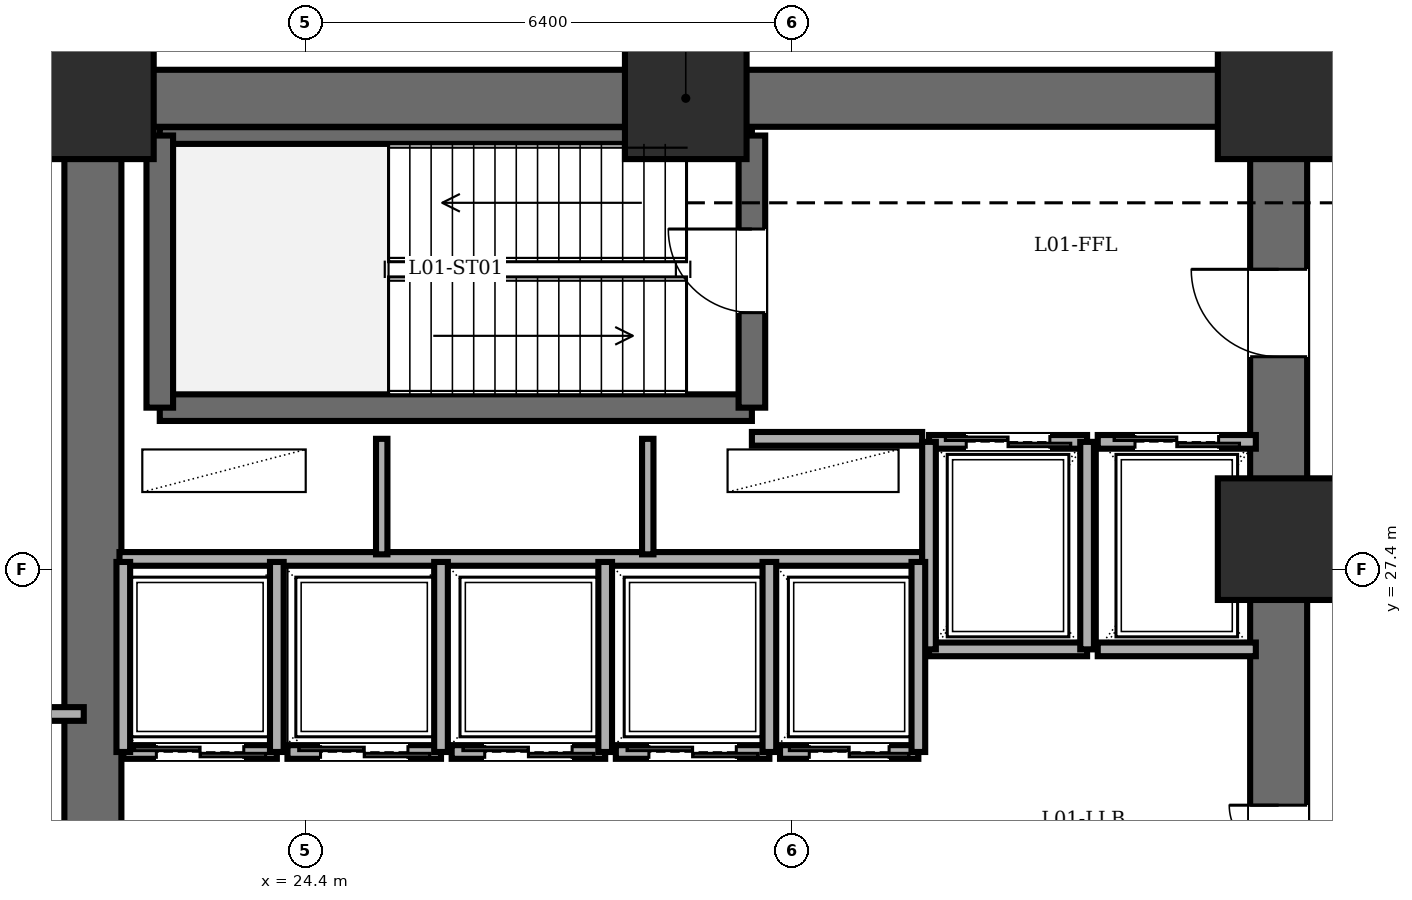
"""IFC4 building model, lengths in metres.
Left out: names, types, materials, properties, quantities, classifications, styles, units other than length and angle.
Written with IfcOpenShell. Run it as: python <this file> out.ifc"""

import sys

from ifc_helpers import new_model, si_unit, direction, frame, frame_2d, origin, origin_2d, place, context, subcontext, project, spatial, rectangle, extrude, element, fill, save


model = new_model("IFC4")
c1 = context("Model", 3, precision=1e-05, world=origin(), true_north=direction((0.0, 1.0)))
c2 = subcontext(c1, "Body", "Model", "MODEL_VIEW")
j1 = project(units=[si_unit("LENGTHUNIT", "METRE"), si_unit("PLANEANGLEUNIT", "RADIAN")], contexts=[c1])
p1 = place(None, origin())
s1 = spatial("IfcSite", under=j1, at=p1, CompositionType="ELEMENT")
p2 = place(p1, origin())
s2 = spatial("IfcBuilding", under=s1, at=p2, CompositionType="ELEMENT")
p3 = place(p2, origin())
s3 = spatial("IfcBuildingStorey", under=s2, at=p3, CompositionType="ELEMENT", Elevation=0.0)
for number, where, z_axis, x_axis in (
    (1, (37.2, 27.8, 0.0), (0.0, 0.0, 1.0), (1.0, 0.0, 0.0)),
    (2, (37.2, 33.6, 0.0), (0.0, 0.0, 1.0), (1.0, 0.0, 0.0)),
    (3, (29.4, 33.6, 0.0), (0.0, 0.0, 1.0), (1.0, 0.0, 0.0)),
    (4, (21.6, 33.6, 0.0), (0.0, 0.0, 1.0), (1.0, 0.0, 0.0)),
):
    element("IfcColumn", number, at=place(p3, frame(where, z_axis=z_axis, x_axis=x_axis)), inside=s3, PredefinedType="COLUMN", context=c2, shape_type="SweptSolid", body=[
        extrude(rectangle(XDim=1.6, YDim=1.6, at=origin_2d()), origin(), (0.0, 0.0, 1.0), 5.4),
    ])
p4 = place(p3, frame((21.6, 14.4, 0.0), z_axis=(0.0, 0.0, 1.0), x_axis=(0.0, 1.0, 0.0)))
e5 = element("IfcWall", 5, at=p4, inside=s3, PredefinedType="SHEAR", context=c2, shape_type="SweptSolid", body=[
    extrude(rectangle(XDim=19.2, YDim=0.75, at=frame_2d((9.6, 0.0))), origin(), (0.0, 0.0, 1.0), 5.18),
])
p5 = place(p3, frame((21.6, 33.6, 0.0), z_axis=(0.0, 0.0, 1.0), x_axis=(1.0, 0.0, 0.0)))
e6 = element("IfcWall", 6, at=p5, inside=s3, PredefinedType="SHEAR", context=c2, shape_type="SweptSolid", body=[
    extrude(rectangle(XDim=15.6, YDim=0.75, at=frame_2d((7.8, 0.0))), origin(), (0.0, 0.0, 1.0), 5.18),
])
p6 = place(p3, frame((37.2, 14.4, 0.0), z_axis=(0.0, 0.0, 1.0), x_axis=(0.0, 1.0, 0.0)))
e7 = element("IfcWall", 7, at=p6, inside=s3, PredefinedType="SHEAR", context=c2, shape_type="SweptSolid", body=[
    extrude(rectangle(XDim=19.2, YDim=0.75, at=frame_2d((9.6, 0.0))), origin(), (0.0, 0.0, 1.0), 5.18),
])
p7 = place(p6, frame((15.8, 0.0, 0.0)))
e8 = element("IfcOpeningElement", 8, at=p7, cuts=e7, PredefinedType="OPENING", context=c2, shape_type="SweptSolid", body=[
    extrude(rectangle(XDim=1.15, YDim=2.15, at=frame_2d((0.575, 1.075))), frame((0.0, 0.385, 0.0), z_axis=(0.0, -1.0, 0.0), x_axis=(1.0, 0.0, 0.0)), (0.0, 0.0, 1.0), 0.77),
])
p8 = place(p6, frame((3.6, 0.0, 0.0)))
e9 = element("IfcOpeningElement", 9, at=p8, cuts=e7, PredefinedType="OPENING", context=c2, shape_type="SweptSolid", body=[
    extrude(rectangle(XDim=1.1, YDim=2.15, at=frame_2d((0.55, 1.075))), frame((0.0, 0.385, 0.0), z_axis=(0.0, -1.0, 0.0), x_axis=(1.0, 0.0, 0.0)), (0.0, 0.0, 1.0), 0.77),
])
p9 = place(p6, frame((8.6, 0.0, 0.0)))
e10 = element("IfcOpeningElement", 10, at=p9, cuts=e7, PredefinedType="OPENING", context=c2, shape_type="SweptSolid", body=[
    extrude(rectangle(XDim=1.3, YDim=2.2, at=frame_2d((0.65, 1.1))), frame((0.0, 0.385, 0.0), z_axis=(0.0, -1.0, 0.0), x_axis=(1.0, 0.0, 0.0)), (0.0, 0.0, 1.0), 0.77),
])
p10 = place(p3, frame((22.48, 29.53, 0.0), z_axis=(0.0, 0.0, 1.0), x_axis=(1.0, 0.0, 0.0)))
e11 = element("IfcWall", 11, at=p10, inside=s3, PredefinedType="SOLIDWALL", context=c2, shape_type="SweptSolid", body=[
    extrude(rectangle(XDim=7.79, YDim=0.35, at=frame_2d((3.895, 0.0))), origin(), (0.0, 0.0, 1.0), 5.18),
])
p11 = place(p3, frame((22.48, 33.11, 0.0), z_axis=(0.0, 0.0, 1.0), x_axis=(1.0, 0.0, 0.0)))
e12 = element("IfcWall", 12, at=p11, inside=s3, PredefinedType="PARTITIONING", context=c2, shape_type="SweptSolid", body=[
    extrude(rectangle(XDim=7.79, YDim=0.22, at=frame_2d((3.895, 0.0))), origin(), (0.0, 0.0, 1.0), 5.18),
])
p12 = place(p3, frame((22.48, 29.53, 0.0), z_axis=(0.0, 0.0, 1.0), x_axis=(0.0, 1.0, 0.0)))
e13 = element("IfcWall", 13, at=p12, inside=s3, PredefinedType="SOLIDWALL", context=c2, shape_type="SweptSolid", body=[
    extrude(rectangle(XDim=3.58, YDim=0.35, at=frame_2d((1.79, 0.0))), origin(), (0.0, 0.0, 1.0), 5.18),
])
p13 = place(p3, frame((30.27, 29.53, 0.0), z_axis=(0.0, 0.0, 1.0), x_axis=(0.0, 1.0, 0.0)))
e14 = element("IfcWall", 14, at=p13, inside=s3, PredefinedType="SOLIDWALL", context=c2, shape_type="SweptSolid", body=[
    extrude(rectangle(XDim=3.58, YDim=0.35, at=frame_2d((1.79, 0.0))), origin(), (0.0, 0.0, 1.0), 5.18),
])
p14 = place(p13, frame((1.25, 0.0, 0.0)))
e15 = element("IfcOpeningElement", 15, at=p14, cuts=e14, PredefinedType="OPENING", context=c2, shape_type="SweptSolid", body=[
    extrude(rectangle(XDim=1.1, YDim=2.15, at=frame_2d((0.55, 1.075))), frame((0.0, 0.185, 0.0), z_axis=(0.0, -1.0, 0.0), x_axis=(1.0, 0.0, 0.0)), (0.0, 0.0, 1.0), 0.37),
])
p15 = place(p3, frame((30.27, 29.12, 0.0), z_axis=(0.0, 0.0, 1.0), x_axis=(1.0, 0.0, 0.0)))
e16 = element("IfcWall", 16, at=p15, inside=s3, PredefinedType="PARTITIONING", context=c2, shape_type="SweptSolid", body=[
    extrude(rectangle(XDim=2.24, YDim=0.18, at=frame_2d((1.12, 0.0))), origin(), (0.0, 0.0, 1.0), 5.18),
])
p16 = place(p3, frame((21.95, 27.54, 0.0), z_axis=(0.0, 0.0, 1.0), x_axis=(1.0, 0.0, 0.0)))
e17 = element("IfcWall", 17, at=p16, inside=s3, PredefinedType="PARTITIONING", context=c2, shape_type="SweptSolid", body=[
    extrude(rectangle(XDim=10.56, YDim=0.18, at=frame_2d((5.28, 0.0))), origin(), (0.0, 0.0, 1.0), 5.18),
])
for number, where, z_axis, x_axis in (
    (18, (25.4, 27.6, 0.0), (0.0, 0.0, 1.0), (0.0, 1.0, 0.0)),
    (19, (28.9, 27.6, 0.0), (0.0, 0.0, 1.0), (0.0, 1.0, 0.0)),
):
    element("IfcWall", number, at=place(p3, frame(where, z_axis=z_axis, x_axis=x_axis)), inside=s3, PredefinedType="PARTITIONING", context=c2, shape_type="SweptSolid", body=[
        extrude(rectangle(XDim=1.52, YDim=0.15, at=frame_2d((0.76, 0.0))), origin(), (0.0, 0.0, 1.0), 5.18),
    ])
p17 = place(p3, frame((32.6, 29.08, 0.0), z_axis=(0.0, 0.0, 1.0), x_axis=(1.0, 0.0, 0.0)))
e20 = element("IfcWall", 20, at=p17, inside=s3, PredefinedType="PARTITIONING", context=c2, shape_type="SweptSolid", body=[
    extrude(rectangle(XDim=2.08, YDim=0.18, at=frame_2d((1.04, 0.0))), origin(), (0.0, 0.0, 1.0), 5.18),
])
p18 = place(p17, frame((0.49, 0.0, 0.0)))
e21 = element("IfcOpeningElement", 21, at=p18, cuts=e20, PredefinedType="OPENING", context=c2, shape_type="SweptSolid", body=[
    extrude(rectangle(XDim=1.1, YDim=2.2, at=frame_2d((0.55, 1.1))), frame((0.0, 0.1, 0.0), z_axis=(0.0, -1.0, 0.0), x_axis=(1.0, 0.0, 0.0)), (0.0, 0.0, 1.0), 0.2),
])
p19 = place(p3, frame((34.68, 26.35, 0.0), z_axis=(0.0, 0.0, 1.0), x_axis=(-1.0, 0.0, 0.0)))
e22 = element("IfcWall", 22, at=p19, inside=s3, PredefinedType="PARTITIONING", context=c2, shape_type="SweptSolid", body=[
    extrude(rectangle(XDim=2.08, YDim=0.18, at=frame_2d((1.04, 0.0))), origin(), (0.0, 0.0, 1.0), 5.18),
])
for number, where, z_axis, x_axis in (
    (23, (34.68, 26.35, 0.0), (0.0, 0.0, 1.0), (0.0, 1.0, 0.0)),
    (24, (32.6, 29.08, 0.0), (0.0, 0.0, 1.0), (0.0, -1.0, 0.0)),
):
    element("IfcWall", number, at=place(p3, frame(where, z_axis=z_axis, x_axis=x_axis)), inside=s3, PredefinedType="PARTITIONING", context=c2, shape_type="SweptSolid", body=[
        extrude(rectangle(XDim=2.73, YDim=0.18, at=frame_2d((1.365, 0.0))), origin(), (0.0, 0.0, 1.0), 5.18),
    ])
p20 = place(p3, frame((34.82, 29.08, 0.0), z_axis=(0.0, 0.0, 1.0), x_axis=(1.0, 0.0, 0.0)))
e25 = element("IfcWall", 25, at=p20, inside=s3, PredefinedType="PARTITIONING", context=c2, shape_type="SweptSolid", body=[
    extrude(rectangle(XDim=2.08, YDim=0.18, at=frame_2d((1.04, 0.0))), origin(), (0.0, 0.0, 1.0), 5.18),
])
p21 = place(p20, frame((0.49, 0.0, 0.0)))
e26 = element("IfcOpeningElement", 26, at=p21, cuts=e25, PredefinedType="OPENING", context=c2, shape_type="SweptSolid", body=[
    extrude(rectangle(XDim=1.1, YDim=2.2, at=frame_2d((0.55, 1.1))), frame((0.0, 0.1, 0.0), z_axis=(0.0, -1.0, 0.0), x_axis=(1.0, 0.0, 0.0)), (0.0, 0.0, 1.0), 0.2),
])
p22 = place(p3, frame((36.9, 26.35, 0.0), z_axis=(0.0, 0.0, 1.0), x_axis=(-1.0, 0.0, 0.0)))
e27 = element("IfcWall", 27, at=p22, inside=s3, PredefinedType="PARTITIONING", context=c2, shape_type="SweptSolid", body=[
    extrude(rectangle(XDim=2.08, YDim=0.18, at=frame_2d((1.04, 0.0))), origin(), (0.0, 0.0, 1.0), 5.18),
])
p23 = place(p3, frame((24.02, 25.0, 0.0), z_axis=(0.0, 0.0, 1.0), x_axis=(-1.0, 0.0, 0.0)))
e28 = element("IfcWall", 28, at=p23, inside=s3, PredefinedType="PARTITIONING", context=c2, shape_type="SweptSolid", body=[
    extrude(rectangle(XDim=2.02, YDim=0.18, at=frame_2d((1.01, 0.0))), origin(), (0.0, 0.0, 1.0), 5.18),
])
p24 = place(p23, frame((0.435, 0.0, 0.0)))
e29 = element("IfcOpeningElement", 29, at=p24, cuts=e28, PredefinedType="OPENING", context=c2, shape_type="SweptSolid", body=[
    extrude(rectangle(XDim=1.15, YDim=2.2, at=frame_2d((0.575, 1.1))), frame((0.0, 0.1, 0.0), z_axis=(0.0, -1.0, 0.0), x_axis=(1.0, 0.0, 0.0)), (0.0, 0.0, 1.0), 0.2),
])
for number, where, z_axis, x_axis in (
    (30, (24.02, 25.0, 0.0), (0.0, 0.0, 1.0), (0.0, 1.0, 0.0)),
    (31, (22.0, 27.5, 0.0), (0.0, 0.0, 1.0), (0.0, -1.0, 0.0)),
):
    element("IfcWall", number, at=place(p3, frame(where, z_axis=z_axis, x_axis=x_axis)), inside=s3, PredefinedType="PARTITIONING", context=c2, shape_type="SweptSolid", body=[
        extrude(rectangle(XDim=2.5, YDim=0.18, at=frame_2d((1.25, 0.0))), origin(), (0.0, 0.0, 1.0), 5.18),
    ])
p25 = place(p3, frame((26.18, 25.0, 0.0), z_axis=(0.0, 0.0, 1.0), x_axis=(-1.0, 0.0, 0.0)))
e32 = element("IfcWall", 32, at=p25, inside=s3, PredefinedType="PARTITIONING", context=c2, shape_type="SweptSolid", body=[
    extrude(rectangle(XDim=2.02, YDim=0.18, at=frame_2d((1.01, 0.0))), origin(), (0.0, 0.0, 1.0), 5.18),
])
p26 = place(p25, frame((0.435, 0.0, 0.0)))
e33 = element("IfcOpeningElement", 33, at=p26, cuts=e32, PredefinedType="OPENING", context=c2, shape_type="SweptSolid", body=[
    extrude(rectangle(XDim=1.15, YDim=2.2, at=frame_2d((0.575, 1.1))), frame((0.0, 0.1, 0.0), z_axis=(0.0, -1.0, 0.0), x_axis=(1.0, 0.0, 0.0)), (0.0, 0.0, 1.0), 0.2),
])
p27 = place(p3, frame((26.18, 25.0, 0.0), z_axis=(0.0, 0.0, 1.0), x_axis=(0.0, 1.0, 0.0)))
e34 = element("IfcWall", 34, at=p27, inside=s3, PredefinedType="PARTITIONING", context=c2, shape_type="SweptSolid", body=[
    extrude(rectangle(XDim=2.5, YDim=0.18, at=frame_2d((1.25, 0.0))), origin(), (0.0, 0.0, 1.0), 5.18),
])
p28 = place(p3, frame((28.34, 25.0, 0.0), z_axis=(0.0, 0.0, 1.0), x_axis=(-1.0, 0.0, 0.0)))
e35 = element("IfcWall", 35, at=p28, inside=s3, PredefinedType="PARTITIONING", context=c2, shape_type="SweptSolid", body=[
    extrude(rectangle(XDim=2.02, YDim=0.18, at=frame_2d((1.01, 0.0))), origin(), (0.0, 0.0, 1.0), 5.18),
])
p29 = place(p28, frame((0.435, 0.0, 0.0)))
e36 = element("IfcOpeningElement", 36, at=p29, cuts=e35, PredefinedType="OPENING", context=c2, shape_type="SweptSolid", body=[
    extrude(rectangle(XDim=1.15, YDim=2.2, at=frame_2d((0.575, 1.1))), frame((0.0, 0.1, 0.0), z_axis=(0.0, -1.0, 0.0), x_axis=(1.0, 0.0, 0.0)), (0.0, 0.0, 1.0), 0.2),
])
p30 = place(p3, frame((28.34, 25.0, 0.0), z_axis=(0.0, 0.0, 1.0), x_axis=(0.0, 1.0, 0.0)))
e37 = element("IfcWall", 37, at=p30, inside=s3, PredefinedType="PARTITIONING", context=c2, shape_type="SweptSolid", body=[
    extrude(rectangle(XDim=2.5, YDim=0.18, at=frame_2d((1.25, 0.0))), origin(), (0.0, 0.0, 1.0), 5.18),
])
p31 = place(p3, frame((30.5, 25.0, 0.0), z_axis=(0.0, 0.0, 1.0), x_axis=(-1.0, 0.0, 0.0)))
e38 = element("IfcWall", 38, at=p31, inside=s3, PredefinedType="PARTITIONING", context=c2, shape_type="SweptSolid", body=[
    extrude(rectangle(XDim=2.02, YDim=0.18, at=frame_2d((1.01, 0.0))), origin(), (0.0, 0.0, 1.0), 5.18),
])
p32 = place(p31, frame((0.435, 0.0, 0.0)))
e39 = element("IfcOpeningElement", 39, at=p32, cuts=e38, PredefinedType="OPENING", context=c2, shape_type="SweptSolid", body=[
    extrude(rectangle(XDim=1.15, YDim=2.2, at=frame_2d((0.575, 1.1))), frame((0.0, 0.1, 0.0), z_axis=(0.0, -1.0, 0.0), x_axis=(1.0, 0.0, 0.0)), (0.0, 0.0, 1.0), 0.2),
])
p33 = place(p3, frame((30.5, 25.0, 0.0), z_axis=(0.0, 0.0, 1.0), x_axis=(0.0, 1.0, 0.0)))
e40 = element("IfcWall", 40, at=p33, inside=s3, PredefinedType="PARTITIONING", context=c2, shape_type="SweptSolid", body=[
    extrude(rectangle(XDim=2.5, YDim=0.18, at=frame_2d((1.25, 0.0))), origin(), (0.0, 0.0, 1.0), 5.18),
])
p34 = place(p3, frame((32.46, 25.0, 0.0), z_axis=(0.0, 0.0, 1.0), x_axis=(-1.0, 0.0, 0.0)))
e41 = element("IfcWall", 41, at=p34, inside=s3, PredefinedType="PARTITIONING", context=c2, shape_type="SweptSolid", body=[
    extrude(rectangle(XDim=1.82, YDim=0.18, at=frame_2d((0.91, 0.0))), origin(), (0.0, 0.0, 1.0), 5.18),
])
p35 = place(p34, frame((0.385, 0.0, 0.0)))
e42 = element("IfcOpeningElement", 42, at=p35, cuts=e41, PredefinedType="OPENING", context=c2, shape_type="SweptSolid", body=[
    extrude(rectangle(XDim=1.05, YDim=2.2, at=frame_2d((0.525, 1.1))), frame((0.0, 0.1, 0.0), z_axis=(0.0, -1.0, 0.0), x_axis=(1.0, 0.0, 0.0)), (0.0, 0.0, 1.0), 0.2),
])
p36 = place(p3, frame((32.46, 25.0, 0.0), z_axis=(0.0, 0.0, 1.0), x_axis=(0.0, 1.0, 0.0)))
e43 = element("IfcWall", 43, at=p36, inside=s3, PredefinedType="PARTITIONING", context=c2, shape_type="SweptSolid", body=[
    extrude(rectangle(XDim=2.5, YDim=0.18, at=frame_2d((1.25, 0.0))), origin(), (0.0, 0.0, 1.0), 5.18),
])
p37 = place(p3, frame((1.6, 25.5, 0.0), z_axis=(0.0, 0.0, 1.0), x_axis=(1.0, 0.0, 0.0)))
e44 = element("IfcWall", 44, at=p37, inside=s3, PredefinedType="PARTITIONING", context=c2, shape_type="SweptSolid", body=[
    extrude(rectangle(XDim=19.88, YDim=0.18, at=frame_2d((9.94, 0.0))), origin(), (0.0, 0.0, 1.0), 5.18),
])
p38 = place(p37, frame((7.96, 0.0, 0.0)))
e45 = element("IfcOpeningElement", 45, at=p38, cuts=e44, PredefinedType="OPENING", context=c2, shape_type="SweptSolid", body=[
    extrude(rectangle(XDim=0.9, YDim=2.05, at=frame_2d((0.45, 1.025))), frame((0.0, 0.1, 0.0), z_axis=(0.0, -1.0, 0.0), x_axis=(1.0, 0.0, 0.0)), (0.0, 0.0, 1.0), 0.2),
])
p39 = place(p14, origin())
e46 = element("IfcDoor", 46, at=p39, inside=s3, OperationType="SINGLE_SWING_RIGHT", PredefinedType="DOOR", context=c2, shape_type="SweptSolid", body=[
    extrude(rectangle(XDim=1.1, YDim=2.15, at=frame_2d((0.55, 1.075))), frame((0.0, 0.025, 0.0), z_axis=(0.0, -1.0, 0.0), x_axis=(1.0, 0.0, 0.0)), (0.0, 0.0, 1.0), 0.05),
])
fill(e15, e46)
p40 = place(p7, origin())
e47 = element("IfcDoor", 47, at=p40, inside=s3, OperationType="SINGLE_SWING_RIGHT", PredefinedType="DOOR", context=c2, shape_type="SweptSolid", body=[
    extrude(rectangle(XDim=1.15, YDim=2.15, at=frame_2d((0.575, 1.075))), frame((0.0, 0.025, 0.0), z_axis=(0.0, -1.0, 0.0), x_axis=(1.0, 0.0, 0.0)), (0.0, 0.0, 1.0), 0.05),
])
fill(e8, e47)
p41 = place(p18, origin())
e48 = element("IfcDoor", 48, at=p41, inside=s3, OperationType="DOUBLE_DOOR_SLIDING", PredefinedType="DOOR", context=c2, shape_type="SweptSolid", body=[
    extrude(rectangle(XDim=1.1, YDim=2.2, at=frame_2d((0.55, 1.1))), frame((0.0, 0.025, 0.0), z_axis=(0.0, -1.0, 0.0), x_axis=(1.0, 0.0, 0.0)), (0.0, 0.0, 1.0), 0.05),
])
fill(e21, e48)
p42 = place(p21, origin())
e49 = element("IfcDoor", 49, at=p42, inside=s3, OperationType="DOUBLE_DOOR_SLIDING", PredefinedType="DOOR", context=c2, shape_type="SweptSolid", body=[
    extrude(rectangle(XDim=1.1, YDim=2.2, at=frame_2d((0.55, 1.1))), frame((0.0, 0.025, 0.0), z_axis=(0.0, -1.0, 0.0), x_axis=(1.0, 0.0, 0.0)), (0.0, 0.0, 1.0), 0.05),
])
fill(e26, e49)
p43 = place(p24, origin())
e50 = element("IfcDoor", 50, at=p43, inside=s3, OperationType="DOUBLE_DOOR_SLIDING", PredefinedType="DOOR", context=c2, shape_type="SweptSolid", body=[
    extrude(rectangle(XDim=1.15, YDim=2.2, at=frame_2d((0.575, 1.1))), frame((0.0, 0.025, 0.0), z_axis=(0.0, -1.0, 0.0), x_axis=(1.0, 0.0, 0.0)), (0.0, 0.0, 1.0), 0.05),
])
fill(e29, e50)
p44 = place(p26, origin())
e51 = element("IfcDoor", 51, at=p44, inside=s3, OperationType="DOUBLE_DOOR_SLIDING", PredefinedType="DOOR", context=c2, shape_type="SweptSolid", body=[
    extrude(rectangle(XDim=1.15, YDim=2.2, at=frame_2d((0.575, 1.1))), frame((0.0, 0.025, 0.0), z_axis=(0.0, -1.0, 0.0), x_axis=(1.0, 0.0, 0.0)), (0.0, 0.0, 1.0), 0.05),
])
fill(e33, e51)
p45 = place(p29, origin())
e52 = element("IfcDoor", 52, at=p45, inside=s3, OperationType="DOUBLE_DOOR_SLIDING", PredefinedType="DOOR", context=c2, shape_type="SweptSolid", body=[
    extrude(rectangle(XDim=1.15, YDim=2.2, at=frame_2d((0.575, 1.1))), frame((0.0, 0.025, 0.0), z_axis=(0.0, -1.0, 0.0), x_axis=(1.0, 0.0, 0.0)), (0.0, 0.0, 1.0), 0.05),
])
fill(e36, e52)
p46 = place(p32, origin())
e53 = element("IfcDoor", 53, at=p46, inside=s3, OperationType="DOUBLE_DOOR_SLIDING", PredefinedType="DOOR", context=c2, shape_type="SweptSolid", body=[
    extrude(rectangle(XDim=1.15, YDim=2.2, at=frame_2d((0.575, 1.1))), frame((0.0, 0.025, 0.0), z_axis=(0.0, -1.0, 0.0), x_axis=(1.0, 0.0, 0.0)), (0.0, 0.0, 1.0), 0.05),
])
fill(e39, e53)
p47 = place(p35, origin())
e54 = element("IfcDoor", 54, at=p47, inside=s3, OperationType="DOUBLE_DOOR_SLIDING", PredefinedType="DOOR", context=c2, shape_type="SweptSolid", body=[
    extrude(rectangle(XDim=1.05, YDim=2.2, at=frame_2d((0.525, 1.1))), frame((0.0, 0.025, 0.0), z_axis=(0.0, -1.0, 0.0), x_axis=(1.0, 0.0, 0.0)), (0.0, 0.0, 1.0), 0.05),
])
fill(e42, e54)
p48 = place(p9, origin())
e55 = element("IfcDoor", 55, at=p48, inside=s3, OperationType="DOUBLE_DOOR_SINGLE_SWING", PredefinedType="DOOR", context=c2, shape_type="SweptSolid", body=[
    extrude(rectangle(XDim=1.3, YDim=2.2, at=frame_2d((0.65, 1.1))), frame((0.0, 0.025, 0.0), z_axis=(0.0, -1.0, 0.0), x_axis=(1.0, 0.0, 0.0)), (0.0, 0.0, 1.0), 0.05),
])
fill(e10, e55)
save(model, sys.argv[1])
